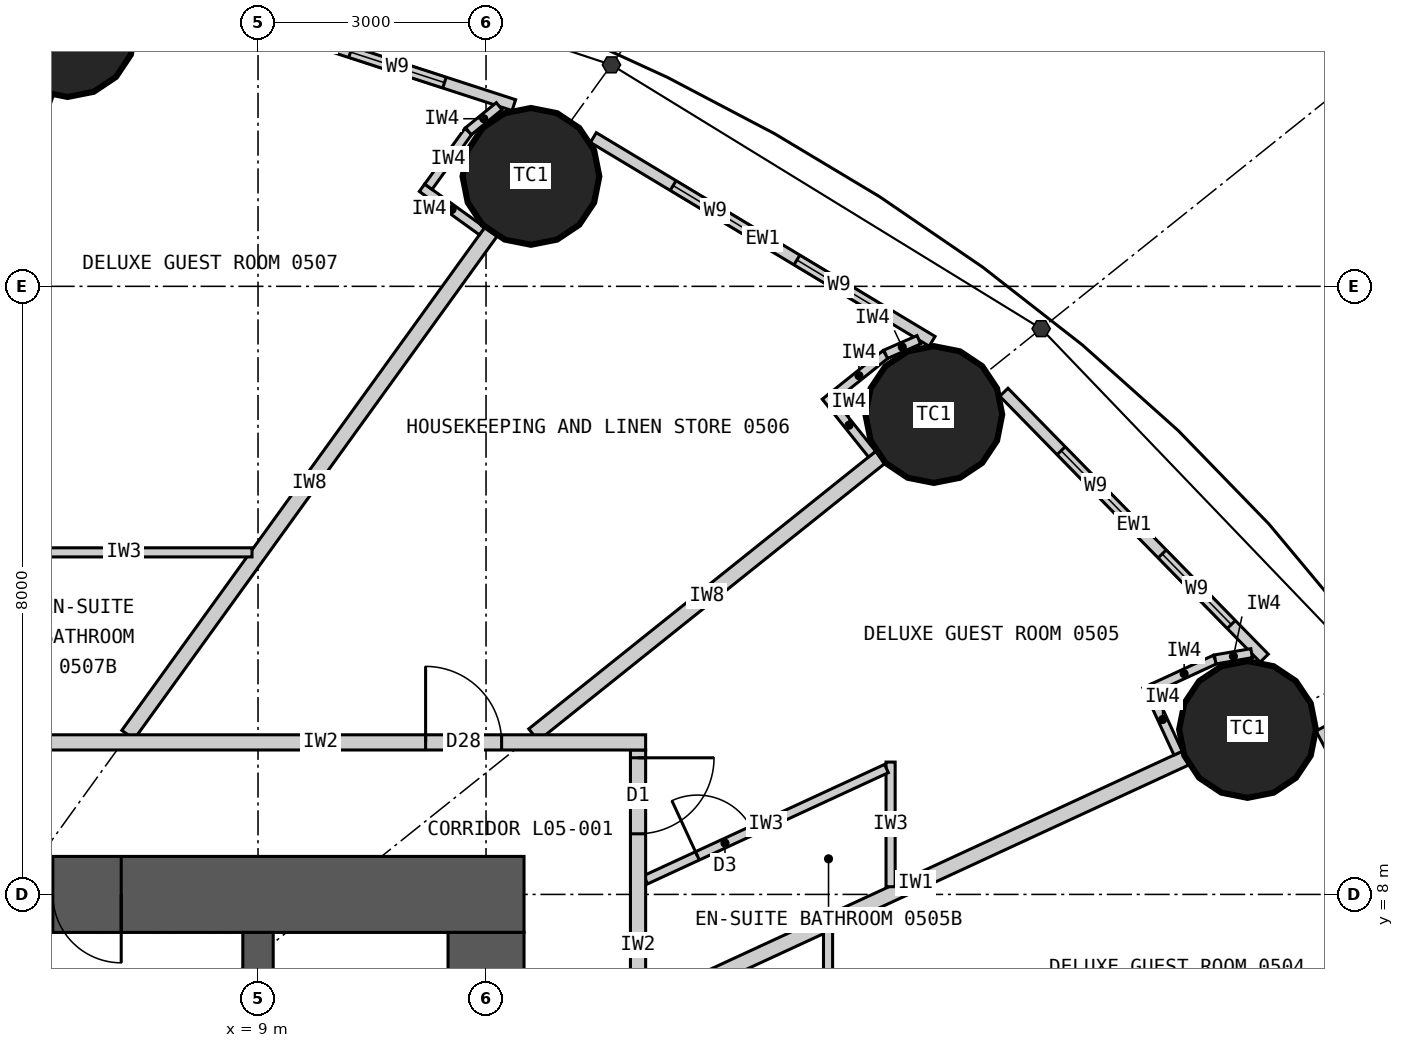
"""IFC4 building model, lengths in metres.
Left out: names, types, materials, properties, quantities, classifications, styles, units other than length and angle.
Written with IfcOpenShell. Run it as: python <this file> out.ifc"""

import sys

from ifc_helpers import new_model, si_unit, direction, frame, frame_2d, origin, origin_2d, place, context, subcontext, project, spatial, rectangle, circle, extrude, element, fill, save


model = new_model("IFC4")
c1 = context("Model", 3, precision=1e-05, world=origin(), true_north=direction((0.0, 1.0)))
c2 = subcontext(c1, "Body", "Model", "MODEL_VIEW")
j1 = project(units=[si_unit("LENGTHUNIT", "METRE"), si_unit("PLANEANGLEUNIT", "RADIAN")], contexts=[c1])
p1 = place(None, origin())
s1 = spatial("IfcSite", under=j1, at=p1, CompositionType="ELEMENT")
p2 = place(p1, origin())
s2 = spatial("IfcBuilding", under=s1, at=p2, CompositionType="ELEMENT")
p3 = place(p2, frame((0.0, 0.0, 29.4)))
s3 = spatial("IfcBuildingStorey", under=s2, at=p3, CompositionType="ELEMENT", Elevation=29.4)
for number, where, z_axis, x_axis in (
    (1, (22.019, 10.17, 0.0), (0.0, 0.0, 1.0), (1.0, 0.0, 0.0)),
    (2, (17.892, 14.313, 0.0), (0.0, 0.0, 1.0), (1.0, 0.0, 0.0)),
    (3, (12.591, 17.447, 0.0), (0.0, 0.0, 1.0), (1.0, 0.0, 0.0)),
    (4, (6.495, 19.391, 0.0), (0.0, 0.0, 1.0), (1.0, 0.0, 0.0)),
):
    element("IfcColumn", number, at=place(p3, frame(where, z_axis=z_axis, x_axis=x_axis)), inside=s3, PredefinedType="COLUMN", context=c2, shape_type="SweptSolid", body=[
        extrude(circle(Radius=0.9, at=origin_2d()), origin(), (0.0, 0.0, 1.0), 3.3),
    ])
p4 = place(p3, frame((-12.5, 8.0, 0.0), z_axis=(0.0, 0.0, 1.0), x_axis=(1.0, 0.0, 0.0)))
e5 = element("IfcWall", 5, at=p4, inside=s3, PredefinedType="SHEAR", context=c2, shape_type="SweptSolid", body=[
    extrude(rectangle(XDim=25.0, YDim=1.0, at=frame_2d((12.5, 0.0))), origin(), (0.0, 0.0, 1.0), 3.3),
])
p5 = place(p4, frame((11.2, 0.0, 0.0)))
e6 = element("IfcOpeningElement", 6, at=p5, cuts=e5, PredefinedType="OPENING", context=c2, shape_type="SweptSolid", body=[
    extrude(rectangle(XDim=1.2, YDim=2.2, at=frame_2d((0.6, 1.1))), frame((0.0, 0.51, 0.0), z_axis=(0.0, -1.0, 0.0), x_axis=(1.0, 0.0, 0.0)), (0.0, 0.0, 1.0), 1.02),
])
p6 = place(p4, frame((18.8, 0.0, 0.0)))
e7 = element("IfcOpeningElement", 7, at=p6, cuts=e5, PredefinedType="OPENING", context=c2, shape_type="SweptSolid", body=[
    extrude(rectangle(XDim=0.9, YDim=2.2, at=frame_2d((0.45, 1.1))), frame((0.0, 0.51, 0.0), z_axis=(0.0, -1.0, 0.0), x_axis=(1.0, 0.0, 0.0)), (0.0, 0.0, 1.0), 1.02),
])
p7 = place(p3, frame((12.0, -7.5, 0.0), z_axis=(0.0, 0.0, 1.0), x_axis=(0.0, 1.0, 0.0)))
e8 = element("IfcWall", 8, at=p7, inside=s3, PredefinedType="SHEAR", context=c2, shape_type="SweptSolid", body=[
    extrude(rectangle(XDim=15.0, YDim=1.0, at=frame_2d((7.5, 0.0))), origin(), (0.0, 0.0, 1.0), 3.3),
])
p8 = place(p7, frame((6.6, 0.0, 0.0)))
e9 = element("IfcOpeningElement", 9, at=p8, cuts=e8, PredefinedType="OPENING", context=c2, shape_type="SweptSolid", body=[
    extrude(rectangle(XDim=1.8, YDim=2.2, at=frame_2d((0.9, 1.1))), frame((0.0, 0.51, 0.0), z_axis=(0.0, -1.0, 0.0), x_axis=(1.0, 0.0, 0.0)), (0.0, 0.0, 1.0), 1.02),
])
p9 = place(p3, frame((9.0, 4.5, 0.0), z_axis=(0.0, 0.0, 1.0), x_axis=(0.0, 1.0, 0.0)))
e10 = element("IfcWall", 10, at=p9, inside=s3, PredefinedType="SHEAR", context=c2, shape_type="SweptSolid", body=[
    extrude(rectangle(XDim=3.0, YDim=0.4, at=frame_2d((1.5, 0.0))), origin(), (0.0, 0.0, 1.0), 3.3),
])
p10 = place(p3, frame((25.139, 6.113, 0.0), z_axis=(0.0, 0.0, 1.0), x_axis=(-0.467303182954, 0.884097129959, 0.0)))
e11 = element("IfcWall", 11, at=p10, inside=s3, PredefinedType="ELEMENTEDWALL", context=c2, shape_type="SweptSolid", body=[
    extrude(rectangle(XDim=4.606, YDim=0.15, at=frame_2d((2.303, 0.0))), origin(), (0.0, 0.0, 1.0), 3.12),
])
p11 = place(p10, frame((0.531, 0.0, 0.9)))
e12 = element("IfcOpeningElement", 12, at=p11, cuts=e11, PredefinedType="OPENING", context=c2, shape_type="SweptSolid", body=[
    extrude(rectangle(XDim=1.3, YDim=1.9, at=frame_2d((0.65, 0.95))), frame((0.0, 0.085, 0.0), z_axis=(0.0, -1.0, 0.0), x_axis=(1.0, 0.0, 0.0)), (0.0, 0.0, 1.0), 0.17),
])
p12 = place(p10, frame((2.432, 0.0, 0.9)))
e13 = element("IfcOpeningElement", 13, at=p12, cuts=e11, PredefinedType="OPENING", context=c2, shape_type="SweptSolid", body=[
    extrude(rectangle(XDim=1.3, YDim=1.9, at=frame_2d((0.65, 0.95))), frame((0.0, 0.085, 0.0), z_axis=(0.0, -1.0, 0.0), x_axis=(1.0, 0.0, 0.0)), (0.0, 0.0, 1.0), 0.17),
])
p13 = place(p3, frame((22.239, 11.108, 0.0), z_axis=(0.0, 0.0, 1.0), x_axis=(-0.699612594083, 0.714522370679, 0.0)))
e14 = element("IfcWall", 14, at=p13, inside=s3, PredefinedType="ELEMENTEDWALL", context=c2, shape_type="SweptSolid", body=[
    extrude(rectangle(XDim=4.896, YDim=0.15, at=frame_2d((2.448, 0.0))), origin(), (0.0, 0.0, 1.0), 3.12),
])
p14 = place(p13, frame((0.619, 0.0, 0.9)))
e15 = element("IfcOpeningElement", 15, at=p14, cuts=e14, PredefinedType="OPENING", context=c2, shape_type="SweptSolid", body=[
    extrude(rectangle(XDim=1.3, YDim=1.9, at=frame_2d((0.65, 0.95))), frame((0.0, 0.085, 0.0), z_axis=(0.0, -1.0, 0.0), x_axis=(1.0, 0.0, 0.0)), (0.0, 0.0, 1.0), 0.17),
])
p15 = place(p13, frame((2.519, 0.0, 0.9)))
e16 = element("IfcOpeningElement", 16, at=p15, cuts=e14, PredefinedType="OPENING", context=c2, shape_type="SweptSolid", body=[
    extrude(rectangle(XDim=1.3, YDim=1.9, at=frame_2d((0.65, 0.95))), frame((0.0, 0.085, 0.0), z_axis=(0.0, -1.0, 0.0), x_axis=(1.0, 0.0, 0.0)), (0.0, 0.0, 1.0), 0.17),
])
p16 = place(p3, frame((17.869, 15.277, 0.0), z_axis=(0.0, 0.0, 1.0), x_axis=(-0.856958191554, 0.515385931054, 0.0)))
e17 = element("IfcWall", 17, at=p16, inside=s3, PredefinedType="ELEMENTEDWALL", context=c2, shape_type="SweptSolid", body=[
    extrude(rectangle(XDim=5.201, YDim=0.15, at=frame_2d((2.601, 0.0))), origin(), (0.0, 0.0, 1.0), 3.12),
])
p17 = place(p16, frame((0.776, 0.0, 0.9)))
e18 = element("IfcOpeningElement", 18, at=p17, cuts=e17, PredefinedType="OPENING", context=c2, shape_type="SweptSolid", body=[
    extrude(rectangle(XDim=1.3, YDim=1.9, at=frame_2d((0.65, 0.95))), frame((0.0, 0.085, 0.0), z_axis=(0.0, -1.0, 0.0), x_axis=(1.0, 0.0, 0.0)), (0.0, 0.0, 1.0), 0.17),
])
p18 = place(p16, frame((2.676, 0.0, 0.9)))
e19 = element("IfcOpeningElement", 19, at=p18, cuts=e17, PredefinedType="OPENING", context=c2, shape_type="SweptSolid", body=[
    extrude(rectangle(XDim=1.3, YDim=1.9, at=frame_2d((0.65, 0.95))), frame((0.0, 0.085, 0.0), z_axis=(0.0, -1.0, 0.0), x_axis=(1.0, 0.0, 0.0)), (0.0, 0.0, 1.0), 0.17),
])
p19 = place(p3, frame((12.366, 18.384, 0.0), z_axis=(0.0, 0.0, 1.0), x_axis=(-0.951138486029, 0.308764603532, 0.0)))
e20 = element("IfcWall", 20, at=p19, inside=s3, PredefinedType="ELEMENTEDWALL", context=c2, shape_type="SweptSolid", body=[
    extrude(rectangle(XDim=5.444, YDim=0.15, at=frame_2d((2.722, 0.0))), origin(), (0.0, 0.0, 1.0), 3.12),
])
p20 = place(p19, frame((0.96, 0.0, 0.9)))
e21 = element("IfcOpeningElement", 21, at=p20, cuts=e20, PredefinedType="OPENING", context=c2, shape_type="SweptSolid", body=[
    extrude(rectangle(XDim=1.3, YDim=1.9, at=frame_2d((0.65, 0.95))), frame((0.0, 0.085, 0.0), z_axis=(0.0, -1.0, 0.0), x_axis=(1.0, 0.0, 0.0)), (0.0, 0.0, 1.0), 0.17),
])
p21 = place(p19, frame((2.86, 0.0, 0.9)))
e22 = element("IfcOpeningElement", 22, at=p21, cuts=e20, PredefinedType="OPENING", context=c2, shape_type="SweptSolid", body=[
    extrude(rectangle(XDim=1.3, YDim=1.9, at=frame_2d((0.65, 0.95))), frame((0.0, 0.085, 0.0), z_axis=(0.0, -1.0, 0.0), x_axis=(1.0, 0.0, 0.0)), (0.0, 0.0, 1.0), 0.17),
])
p22 = place(p3, frame((14.1, 6.512, 0.0), z_axis=(0.0, 0.0, 1.0), x_axis=(0.907842433118, 0.41931147925, 0.0)))
e23 = element("IfcWall", 23, at=p22, inside=s3, PredefinedType="PARTITIONING", context=c2, shape_type="SweptSolid", body=[
    extrude(rectangle(XDim=7.823, YDim=0.2, at=frame_2d((3.912, 0.0))), origin(), (0.0, 0.0, 1.0), 2.32),
])
p23 = place(p3, frame((12.625, 10.1, 0.0), z_axis=(0.0, 0.0, 1.0), x_axis=(0.780872884676, 0.624689953479, 0.0)))
e24 = element("IfcWall", 24, at=p23, inside=s3, PredefinedType="PARTITIONING", context=c2, shape_type="SweptSolid", body=[
    extrude(rectangle(XDim=5.845, YDim=0.2, at=frame_2d((2.922, 0.0))), origin(), (0.0, 0.0, 1.0), 2.32),
])
p24 = place(p3, frame((7.289, 10.1, 0.0), z_axis=(0.0, 0.0, 1.0), x_axis=(0.585216319319, 0.810877216108, 0.0)))
e25 = element("IfcWall", 25, at=p24, inside=s3, PredefinedType="PARTITIONING", context=c2, shape_type="SweptSolid", body=[
    extrude(rectangle(XDim=8.16, YDim=0.2, at=frame_2d((4.08, 0.0))), origin(), (0.0, 0.0, 1.0), 2.32),
])
p25 = place(p3, frame((3.383, 10.1, 0.0), z_axis=(0.0, 0.0, 1.0), x_axis=(0.317593727596, 0.948226884344, 0.0)))
e26 = element("IfcWall", 26, at=p25, inside=s3, PredefinedType="PARTITIONING", context=c2, shape_type="SweptSolid", body=[
    extrude(rectangle(XDim=8.899, YDim=0.2, at=frame_2d((4.449, 0.0))), origin(), (0.0, 0.0, 1.0), 2.32),
])
p26 = place(p3, frame((16.5, 7.521, 0.0), z_axis=(0.0, 0.0, 1.0), x_axis=(0.0, -1.0, 0.0)))
e27 = element("IfcWall", 27, at=p26, inside=s3, PredefinedType="PARTITIONING", context=c2, shape_type="SweptSolid", body=[
    extrude(rectangle(XDim=2.749, YDim=0.12, at=frame_2d((1.374, 0.0))), origin(), (0.0, 0.0, 1.0), 3.12),
])
p27 = place(p3, frame((17.323, 8.101, 0.0), z_axis=(0.0, 0.0, 1.0), x_axis=(0.0, 1.0, 0.0)))
e28 = element("IfcWall", 28, at=p27, inside=s3, PredefinedType="PARTITIONING", context=c2, shape_type="SweptSolid", body=[
    extrude(rectangle(XDim=1.64, YDim=0.12, at=frame_2d((0.82, 0.0))), origin(), (0.0, 0.0, 1.0), 3.12),
])
p28 = place(p3, frame((14.1, 8.193, 0.0), z_axis=(0.0, 0.0, 1.0), x_axis=(0.907836493557, 0.419324338628, 0.0)))
e29 = element("IfcWall", 29, at=p28, inside=s3, PredefinedType="PARTITIONING", context=c2, shape_type="SweptSolid", body=[
    extrude(rectangle(XDim=3.49, YDim=0.12, at=frame_2d((1.745, 0.0))), origin(), (0.0, 0.0, 1.0), 3.12),
])
p29 = place(p28, frame((0.75, 0.0, 0.0)))
e30 = element("IfcOpeningElement", 30, at=p29, cuts=e29, PredefinedType="OPENING", context=c2, shape_type="SweptSolid", body=[
    extrude(rectangle(XDim=0.8, YDim=2.1, at=frame_2d((0.4, 1.05))), frame((0.0, 0.07, 0.0), z_axis=(0.0, -1.0, 0.0), x_axis=(1.0, 0.0, 0.0)), (0.0, 0.0, 1.0), 0.14),
])
p30 = place(p3, frame((8.921, 12.5, 0.0), z_axis=(0.0, 0.0, 1.0), x_axis=(-1.0, 0.0, 0.0)))
e31 = element("IfcWall", 31, at=p30, inside=s3, PredefinedType="PARTITIONING", context=c2, shape_type="SweptSolid", body=[
    extrude(rectangle(XDim=3.372, YDim=0.12, at=frame_2d((1.686, 0.0))), origin(), (0.0, 0.0, 1.0), 3.12),
])
p31 = place(p3, frame((14.0, 4.772, 0.0), z_axis=(0.0, 0.0, 1.0), x_axis=(0.0, 1.0, 0.0)))
e32 = element("IfcWall", 32, at=p31, inside=s3, PredefinedType="PARTITIONING", context=c2, shape_type="SweptSolid", body=[
    extrude(rectangle(XDim=5.127, YDim=0.2, at=frame_2d((2.564, 0.0))), origin(), (0.0, 0.0, 1.0), 3.12),
])
p32 = place(p31, frame((4.025, 0.0, 0.0)))
e33 = element("IfcOpeningElement", 33, at=p32, cuts=e32, PredefinedType="OPENING", context=c2, shape_type="SweptSolid", body=[
    extrude(rectangle(XDim=1.0, YDim=2.2, at=frame_2d((0.5, 1.1))), frame((0.0, 0.11, 0.0), z_axis=(0.0, -1.0, 0.0), x_axis=(1.0, 0.0, 0.0)), (0.0, 0.0, 1.0), 0.22),
])
p33 = place(p3, frame((5.549, 10.0, 0.0), z_axis=(0.0, 0.0, 1.0), x_axis=(1.0, 0.0, 0.0)))
e34 = element("IfcWall", 34, at=p33, inside=s3, PredefinedType="PARTITIONING", context=c2, shape_type="SweptSolid", body=[
    extrude(rectangle(XDim=8.551, YDim=0.2, at=frame_2d((4.275, 0.0))), origin(), (0.0, 0.0, 1.0), 3.12),
])
p34 = place(p33, frame((5.656, 0.0, 0.0)))
e35 = element("IfcOpeningElement", 35, at=p34, cuts=e34, PredefinedType="OPENING", context=c2, shape_type="SweptSolid", body=[
    extrude(rectangle(XDim=1.0, YDim=2.2, at=frame_2d((0.5, 1.1))), frame((0.0, 0.11, 0.0), z_axis=(0.0, -1.0, 0.0), x_axis=(1.0, 0.0, 0.0)), (0.0, 0.0, 1.0), 0.22),
])
p35 = place(p3, frame((21.106, 9.858, 0.0), z_axis=(0.0, 0.0, 1.0), x_axis=(-0.419344098106, 0.907827366509, 0.0)))
e36 = element("IfcWall", 36, at=p35, inside=s3, PredefinedType="PARTITIONING", context=c2, shape_type="SweptSolid", body=[
    extrude(rectangle(XDim=0.975, YDim=0.12, at=frame_2d((0.487, 0.0))), origin(), (0.0, 0.0, 1.0), 3.12),
])
p36 = place(p3, frame((20.777, 10.714, 0.0), z_axis=(0.0, 0.0, 1.0), x_axis=(0.907832324198, 0.419333365166, 0.0)))
e37 = element("IfcWall", 37, at=p36, inside=s3, PredefinedType="PARTITIONING", context=c2, shape_type="SweptSolid", body=[
    extrude(rectangle(XDim=0.9, YDim=0.12, at=frame_2d((0.45, 0.0))), origin(), (0.0, 0.0, 1.0), 3.12),
])
p37 = place(p3, frame((21.594, 11.091, 0.0), z_axis=(0.0, 0.0, 1.0), x_axis=(0.985483306792, 0.169772353566, 0.0)))
e38 = element("IfcWall", 38, at=p37, inside=s3, PredefinedType="PARTITIONING", context=c2, shape_type="SweptSolid", body=[
    extrude(rectangle(XDim=0.486, YDim=0.12, at=frame_2d((0.243, 0.0))), origin(), (0.0, 0.0, 1.0), 3.12),
])
p38 = place(p3, frame((17.08, 13.792, 0.0), z_axis=(0.0, 0.0, 1.0), x_axis=(-0.624756144097, 0.780819928289, 0.0)))
e39 = element("IfcWall", 39, at=p38, inside=s3, PredefinedType="PARTITIONING", context=c2, shape_type="SweptSolid", body=[
    extrude(rectangle(XDim=0.975, YDim=0.12, at=frame_2d((0.487, 0.0))), origin(), (0.0, 0.0, 1.0), 3.12),
])
p39 = place(p3, frame((16.555, 14.543, 0.0), z_axis=(0.0, 0.0, 1.0), x_axis=(0.780789399477, 0.62479429708, 0.0)))
e40 = element("IfcWall", 40, at=p39, inside=s3, PredefinedType="PARTITIONING", context=c2, shape_type="SweptSolid", body=[
    extrude(rectangle(XDim=0.9, YDim=0.12, at=frame_2d((0.45, 0.0))), origin(), (0.0, 0.0, 1.0), 3.12),
])
p40 = place(p3, frame((17.258, 15.106, 0.0), z_axis=(0.0, 0.0, 1.0), x_axis=(0.916098562583, 0.400953143937, 0.0)))
e41 = element("IfcWall", 41, at=p40, inside=s3, PredefinedType="PARTITIONING", context=c2, shape_type="SweptSolid", body=[
    extrude(rectangle(XDim=0.477, YDim=0.12, at=frame_2d((0.238, 0.0))), origin(), (0.0, 0.0, 1.0), 3.12),
])
p41 = place(p3, frame((11.948, 16.727, 0.0), z_axis=(0.0, 0.0, 1.0), x_axis=(-0.810897160646, 0.585188683123, 0.0)))
e42 = element("IfcWall", 42, at=p41, inside=s3, PredefinedType="PARTITIONING", context=c2, shape_type="SweptSolid", body=[
    extrude(rectangle(XDim=0.975, YDim=0.12, at=frame_2d((0.487, 0.0))), origin(), (0.0, 0.0, 1.0), 3.12),
])
p42 = place(p3, frame((11.241, 17.31, 0.0), z_axis=(0.0, 0.0, 1.0), x_axis=(0.585054732094, 0.810993810367, 0.0)))
e43 = element("IfcWall", 43, at=p42, inside=s3, PredefinedType="PARTITIONING", context=c2, shape_type="SweptSolid", body=[
    extrude(rectangle(XDim=0.9, YDim=0.12, at=frame_2d((0.45, 0.0))), origin(), (0.0, 0.0, 1.0), 3.12),
])
p43 = place(p3, frame((11.768, 18.04, 0.0), z_axis=(0.0, 0.0, 1.0), x_axis=(0.775268927517, 0.631631292787, 0.0)))
e44 = element("IfcWall", 44, at=p43, inside=s3, PredefinedType="PARTITIONING", context=c2, shape_type="SweptSolid", body=[
    extrude(rectangle(XDim=0.522, YDim=0.12, at=frame_2d((0.261, 0.0))), origin(), (0.0, 0.0, 1.0), 3.12),
])
p44 = place(p14, origin())
e45 = element("IfcWindow", 45, at=p44, inside=s3, PartitioningType="SINGLE_PANEL", PredefinedType="WINDOW", context=c2, shape_type="SweptSolid", body=[
    extrude(rectangle(XDim=1.3, YDim=1.9, at=frame_2d((0.65, 0.95))), frame((0.0, 0.03, 0.0), z_axis=(0.0, -1.0, 0.0), x_axis=(1.0, 0.0, 0.0)), (0.0, 0.0, 1.0), 0.06),
])
fill(e15, e45)
p45 = place(p15, origin())
e46 = element("IfcWindow", 46, at=p45, inside=s3, PartitioningType="SINGLE_PANEL", PredefinedType="WINDOW", context=c2, shape_type="SweptSolid", body=[
    extrude(rectangle(XDim=1.3, YDim=1.9, at=frame_2d((0.65, 0.95))), frame((0.0, 0.03, 0.0), z_axis=(0.0, -1.0, 0.0), x_axis=(1.0, 0.0, 0.0)), (0.0, 0.0, 1.0), 0.06),
])
fill(e16, e46)
p46 = place(p17, origin())
e47 = element("IfcWindow", 47, at=p46, inside=s3, PartitioningType="SINGLE_PANEL", PredefinedType="WINDOW", context=c2, shape_type="SweptSolid", body=[
    extrude(rectangle(XDim=1.3, YDim=1.9, at=frame_2d((0.65, 0.95))), frame((0.0, 0.03, 0.0), z_axis=(0.0, -1.0, 0.0), x_axis=(1.0, 0.0, 0.0)), (0.0, 0.0, 1.0), 0.06),
])
fill(e18, e47)
p47 = place(p18, origin())
e48 = element("IfcWindow", 48, at=p47, inside=s3, PartitioningType="SINGLE_PANEL", PredefinedType="WINDOW", context=c2, shape_type="SweptSolid", body=[
    extrude(rectangle(XDim=1.3, YDim=1.9, at=frame_2d((0.65, 0.95))), frame((0.0, 0.03, 0.0), z_axis=(0.0, -1.0, 0.0), x_axis=(1.0, 0.0, 0.0)), (0.0, 0.0, 1.0), 0.06),
])
fill(e19, e48)
p48 = place(p20, origin())
e49 = element("IfcWindow", 49, at=p48, inside=s3, PartitioningType="SINGLE_PANEL", PredefinedType="WINDOW", context=c2, shape_type="SweptSolid", body=[
    extrude(rectangle(XDim=1.3, YDim=1.9, at=frame_2d((0.65, 0.95))), frame((0.0, 0.03, 0.0), z_axis=(0.0, -1.0, 0.0), x_axis=(1.0, 0.0, 0.0)), (0.0, 0.0, 1.0), 0.06),
])
fill(e21, e49)
p49 = place(p29, origin())
e50 = element("IfcDoor", 50, at=p49, inside=s3, OperationType="SINGLE_SWING_LEFT", PredefinedType="DOOR", context=c2, shape_type="SweptSolid", body=[
    extrude(rectangle(XDim=0.8, YDim=2.1, at=frame_2d((0.4, 1.05))), frame((0.0, 0.025, 0.0), z_axis=(0.0, -1.0, 0.0), x_axis=(1.0, 0.0, 0.0)), (0.0, 0.0, 1.0), 0.05),
])
fill(e30, e50)
p50 = place(p32, origin())
e51 = element("IfcDoor", 51, at=p50, inside=s3, OperationType="SINGLE_SWING_RIGHT", PredefinedType="DOOR", context=c2, shape_type="SweptSolid", body=[
    extrude(rectangle(XDim=1.0, YDim=2.2, at=frame_2d((0.5, 1.1))), frame((0.0, 0.025, 0.0), z_axis=(0.0, -1.0, 0.0), x_axis=(1.0, 0.0, 0.0)), (0.0, 0.0, 1.0), 0.05),
])
fill(e33, e51)
p51 = place(p34, origin())
e52 = element("IfcDoor", 52, at=p51, inside=s3, OperationType="SINGLE_SWING_LEFT", PredefinedType="DOOR", context=c2, shape_type="SweptSolid", body=[
    extrude(rectangle(XDim=1.0, YDim=2.2, at=frame_2d((0.5, 1.1))), frame((0.0, 0.025, 0.0), z_axis=(0.0, -1.0, 0.0), x_axis=(1.0, 0.0, 0.0)), (0.0, 0.0, 1.0), 0.05),
])
fill(e35, e52)
p52 = place(p6, origin())
e53 = element("IfcDoor", 53, at=p52, inside=s3, OperationType="SINGLE_SWING_RIGHT", PredefinedType="DOOR", context=c2, shape_type="SweptSolid", body=[
    extrude(rectangle(XDim=0.9, YDim=2.2, at=frame_2d((0.45, 1.1))), frame((0.0, 0.025, 0.0), z_axis=(0.0, -1.0, 0.0), x_axis=(1.0, 0.0, 0.0)), (0.0, 0.0, 1.0), 0.05),
])
fill(e7, e53)
save(model, sys.argv[1])
